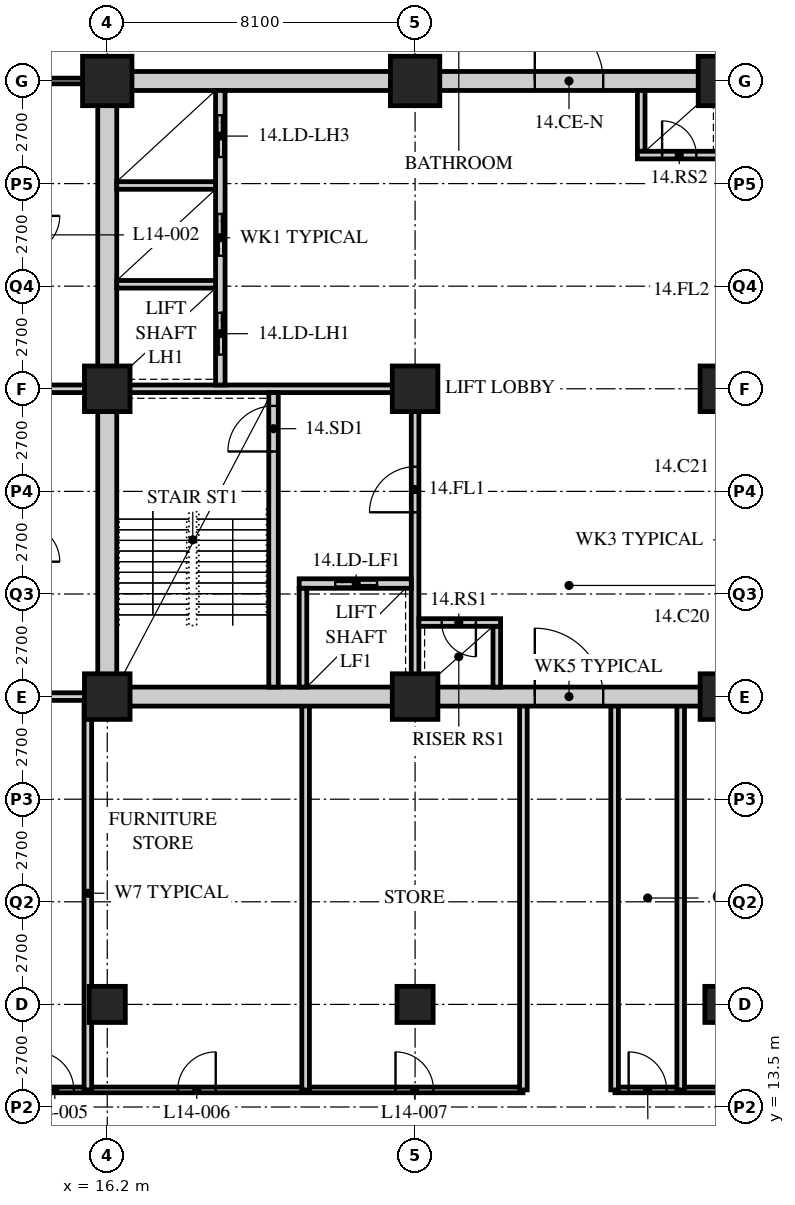
"""IFC4 building model, lengths in metres.
Left out: names, types, materials, properties, quantities, classifications, styles, units other than length and angle.
Written with IfcOpenShell. Run it as: python <this file> out.ifc"""

import sys

from ifc_helpers import new_model, si_unit, direction, frame, frame_2d, origin, origin_2d, place, context, subcontext, project, spatial, rectangle, hollow_rectangle, extrude, element, fill, save


model = new_model("IFC4")
c1 = context("Model", 3, precision=1e-05, world=origin(), true_north=direction((0.0, 1.0)))
c2 = subcontext(c1, "Body", "Model", "MODEL_VIEW")
j1 = project(units=[si_unit("LENGTHUNIT", "METRE"), si_unit("PLANEANGLEUNIT", "RADIAN")], contexts=[c1])
p1 = place(None, origin())
s1 = spatial("IfcSite", under=j1, at=p1, CompositionType="ELEMENT")
p2 = place(p1, origin())
s2 = spatial("IfcBuilding", under=s1, at=p2, CompositionType="ELEMENT")
p3 = place(p2, frame((0.0, 0.0, 60.2)))
s3 = spatial("IfcBuildingStorey", under=s2, at=p3, CompositionType="ELEMENT", Elevation=60.2)
p4 = place(p3, frame((16.2, 16.2, 0.0), z_axis=(0.0, 0.0, 1.0), x_axis=(1.0, 0.0, 0.0)))
e1 = element("IfcColumn", 1, at=p4, inside=s3, PredefinedType="COLUMN", context=c2, shape_type="SweptSolid", body=[
    extrude(hollow_rectangle(XDim=0.95, YDim=0.95, WallThickness=0.095, at=origin_2d()), origin(), (0.0, 0.0, 1.0), 3.4),
])
for number, where, z_axis, x_axis in (
    (2, (16.2, 24.3, 0.0), (0.0, 0.0, 1.0), (1.0, 0.0, 0.0)),
    (3, (16.2, 32.4, 0.0), (0.0, 0.0, 1.0), (1.0, 0.0, 0.0)),
):
    element("IfcColumn", number, at=place(p3, frame(where, z_axis=z_axis, x_axis=x_axis)), inside=s3, PredefinedType="COLUMN", context=c2, shape_type="SweptSolid", body=[
        extrude(hollow_rectangle(XDim=1.2, YDim=1.2, WallThickness=0.12, at=origin_2d()), origin(), (0.0, 0.0, 1.0), 3.4),
    ])
p5 = place(p3, frame((16.2, 40.5, 0.0), z_axis=(0.0, 0.0, 1.0), x_axis=(1.0, 0.0, 0.0)))
e4 = element("IfcColumn", 4, at=p5, inside=s3, PredefinedType="COLUMN", context=c2, shape_type="SweptSolid", body=[
    extrude(hollow_rectangle(XDim=1.3, YDim=1.3, WallThickness=0.13, at=origin_2d()), origin(), (0.0, 0.0, 1.0), 3.4),
])
p6 = place(p3, frame((24.3, 16.2, 0.0), z_axis=(0.0, 0.0, 1.0), x_axis=(1.0, 0.0, 0.0)))
e5 = element("IfcColumn", 5, at=p6, inside=s3, PredefinedType="COLUMN", context=c2, shape_type="SweptSolid", body=[
    extrude(hollow_rectangle(XDim=0.95, YDim=0.95, WallThickness=0.095, at=origin_2d()), origin(), (0.0, 0.0, 1.0), 3.4),
])
for number, where, z_axis, x_axis in (
    (6, (24.3, 24.3, 0.0), (0.0, 0.0, 1.0), (1.0, 0.0, 0.0)),
    (7, (24.3, 32.4, 0.0), (0.0, 0.0, 1.0), (1.0, 0.0, 0.0)),
):
    element("IfcColumn", number, at=place(p3, frame(where, z_axis=z_axis, x_axis=x_axis)), inside=s3, PredefinedType="COLUMN", context=c2, shape_type="SweptSolid", body=[
        extrude(hollow_rectangle(XDim=1.2, YDim=1.2, WallThickness=0.12, at=origin_2d()), origin(), (0.0, 0.0, 1.0), 3.4),
    ])
p7 = place(p3, frame((24.3, 40.5, 0.0), z_axis=(0.0, 0.0, 1.0), x_axis=(1.0, 0.0, 0.0)))
e8 = element("IfcColumn", 8, at=p7, inside=s3, PredefinedType="COLUMN", context=c2, shape_type="SweptSolid", body=[
    extrude(hollow_rectangle(XDim=1.3, YDim=1.3, WallThickness=0.13, at=origin_2d()), origin(), (0.0, 0.0, 1.0), 3.4),
])
p8 = place(p3, frame((32.4, 16.2, 0.0), z_axis=(0.0, 0.0, 1.0), x_axis=(1.0, 0.0, 0.0)))
e9 = element("IfcColumn", 9, at=p8, inside=s3, PredefinedType="COLUMN", context=c2, shape_type="SweptSolid", body=[
    extrude(hollow_rectangle(XDim=0.95, YDim=0.95, WallThickness=0.095, at=origin_2d()), origin(), (0.0, 0.0, 1.0), 3.4),
])
for number, where, z_axis, x_axis in (
    (10, (32.4, 24.3, 0.0), (0.0, 0.0, 1.0), (1.0, 0.0, 0.0)),
    (11, (32.4, 32.4, 0.0), (0.0, 0.0, 1.0), (1.0, 0.0, 0.0)),
):
    element("IfcColumn", number, at=place(p3, frame(where, z_axis=z_axis, x_axis=x_axis)), inside=s3, PredefinedType="COLUMN", context=c2, shape_type="SweptSolid", body=[
        extrude(hollow_rectangle(XDim=1.2, YDim=1.2, WallThickness=0.12, at=origin_2d()), origin(), (0.0, 0.0, 1.0), 3.4),
    ])
p9 = place(p3, frame((32.4, 40.5, 0.0), z_axis=(0.0, 0.0, 1.0), x_axis=(1.0, 0.0, 0.0)))
e12 = element("IfcColumn", 12, at=p9, inside=s3, PredefinedType="COLUMN", context=c2, shape_type="SweptSolid", body=[
    extrude(hollow_rectangle(XDim=1.3, YDim=1.3, WallThickness=0.13, at=origin_2d()), origin(), (0.0, 0.0, 1.0), 3.4),
])
p10 = place(p3, frame((16.0, 40.5, 0.0), z_axis=(0.0, 0.0, 1.0), x_axis=(-1.0, 0.0, 0.0)))
e13 = element("IfcWall", 13, at=p10, inside=s3, PredefinedType="PARTITIONING", context=c2, shape_type="SweptSolid", body=[
    extrude(rectangle(XDim=2.05, YDim=0.15, at=frame_2d((1.025, 0.0))), origin(), (0.0, 0.0, 1.0), 2.578),
])
p11 = place(p3, frame((13.95, 13.95, 0.0), z_axis=(0.0, 0.0, 1.0), x_axis=(1.0, 0.0, 0.0)))
e14 = element("IfcWall", 14, at=p11, inside=s3, PredefinedType="PARTITIONING", context=c2, shape_type="SweptSolid", body=[
    extrude(rectangle(XDim=13.19, YDim=0.15, at=frame_2d((6.595, 0.0))), origin(), (0.0, 0.0, 1.0), 3.19),
])
p12 = place(p11, frame((0.37, 0.0, 0.0)))
e15 = element("IfcOpeningElement", 15, at=p12, cuts=e14, PredefinedType="OPENING", context=c2, shape_type="SweptSolid", body=[
    extrude(rectangle(XDim=1.0, YDim=2.1, at=frame_2d((0.5, 1.05))), frame((0.0, 0.085, 0.0), z_axis=(0.0, -1.0, 0.0), x_axis=(1.0, 0.0, 0.0)), (0.0, 0.0, 1.0), 0.17),
])
p13 = place(p11, frame((4.104, 0.0, 0.0)))
e16 = element("IfcOpeningElement", 16, at=p13, cuts=e14, PredefinedType="OPENING", context=c2, shape_type="SweptSolid", body=[
    extrude(rectangle(XDim=1.0, YDim=2.1, at=frame_2d((0.5, 1.05))), frame((0.0, 0.085, 0.0), z_axis=(0.0, -1.0, 0.0), x_axis=(1.0, 0.0, 0.0)), (0.0, 0.0, 1.0), 0.17),
])
p14 = place(p11, frame((9.835, 0.0, 0.0)))
e17 = element("IfcOpeningElement", 17, at=p14, cuts=e14, PredefinedType="OPENING", context=c2, shape_type="SweptSolid", body=[
    extrude(rectangle(XDim=1.0, YDim=2.1, at=frame_2d((0.5, 1.05))), frame((0.0, 0.085, 0.0), z_axis=(0.0, -1.0, 0.0), x_axis=(1.0, 0.0, 0.0)), (0.0, 0.0, 1.0), 0.17),
])
p15 = place(p3, frame((29.56, 13.95, 0.0), z_axis=(0.0, 0.0, 1.0), x_axis=(1.0, 0.0, 0.0)))
e18 = element("IfcWall", 18, at=p15, inside=s3, PredefinedType="PARTITIONING", context=c2, shape_type="SweptSolid", body=[
    extrude(rectangle(XDim=13.19, YDim=0.15, at=frame_2d((6.595, 0.0))), origin(), (0.0, 0.0, 1.0), 3.19),
])
p16 = place(p15, frame((0.36, 0.0, 0.0)))
e19 = element("IfcOpeningElement", 19, at=p16, cuts=e18, PredefinedType="OPENING", context=c2, shape_type="SweptSolid", body=[
    extrude(rectangle(XDim=1.0, YDim=2.1, at=frame_2d((0.5, 1.05))), frame((0.0, 0.085, 0.0), z_axis=(0.0, -1.0, 0.0), x_axis=(1.0, 0.0, 0.0)), (0.0, 0.0, 1.0), 0.17),
])
p17 = place(p15, frame((4.094, 0.0, 0.0)))
e20 = element("IfcOpeningElement", 20, at=p17, cuts=e18, PredefinedType="OPENING", context=c2, shape_type="SweptSolid", body=[
    extrude(rectangle(XDim=1.0, YDim=2.1, at=frame_2d((0.5, 1.05))), frame((0.0, 0.085, 0.0), z_axis=(0.0, -1.0, 0.0), x_axis=(1.0, 0.0, 0.0)), (0.0, 0.0, 1.0), 0.17),
])
p18 = place(p15, frame((9.825, 0.0, 0.0)))
e21 = element("IfcOpeningElement", 21, at=p18, cuts=e18, PredefinedType="OPENING", context=c2, shape_type="SweptSolid", body=[
    extrude(rectangle(XDim=1.0, YDim=2.1, at=frame_2d((0.5, 1.05))), frame((0.0, 0.085, 0.0), z_axis=(0.0, -1.0, 0.0), x_axis=(1.0, 0.0, 0.0)), (0.0, 0.0, 1.0), 0.17),
])
p19 = place(p3, frame((13.95, 32.4, 0.0), z_axis=(0.0, 0.0, 1.0), x_axis=(1.0, 0.0, 0.0)))
e22 = element("IfcWall", 22, at=p19, inside=s3, PredefinedType="SOLIDWALL", context=c2, shape_type="SweptSolid", body=[
    extrude(rectangle(XDim=2.25, YDim=0.2, at=frame_2d((1.125, 0.0))), origin(), (0.0, 0.0, 1.0), 2.578),
])
for number, where, z_axis, x_axis in (
    (23, (15.689, 13.95, 0.0), (0.0, 0.0, 1.0), (0.0, 1.0, 0.0)),
    (24, (21.42, 13.95, 0.0), (0.0, 0.0, 1.0), (0.0, 1.0, 0.0)),
    (25, (31.289, 13.95, 0.0), (0.0, 0.0, 1.0), (0.0, 1.0, 0.0)),
    (26, (27.15, 13.95, 0.0), (0.0, 0.0, 1.0), (0.0, 1.0, 0.0)),
    (27, (29.55, 13.95, 0.0), (0.0, 0.0, 1.0), (0.0, 1.0, 0.0)),
):
    element("IfcWall", number, at=place(p3, frame(where, z_axis=z_axis, x_axis=x_axis)), inside=s3, PredefinedType="SOLIDWALL", context=c2, shape_type="SweptSolid", body=[
        extrude(rectangle(XDim=10.35, YDim=0.2, at=frame_2d((5.175, 0.0))), origin(), (0.0, 0.0, 1.0), 3.19),
    ])
p20 = place(p3, frame((13.95, 24.3, 0.0), z_axis=(0.0, 0.0, 1.0), x_axis=(1.0, 0.0, 0.0)))
e28 = element("IfcWall", 28, at=p20, inside=s3, PredefinedType="SOLIDWALL", context=c2, shape_type="SweptSolid", body=[
    extrude(rectangle(XDim=2.25, YDim=0.2, at=frame_2d((1.125, 0.0))), origin(), (0.0, 0.0, 1.0), 2.578),
])
p21 = place(p3, frame((15.95, 24.3, 0.0), z_axis=(0.0, 0.0, 1.0), x_axis=(1.0, 0.0, 0.0)))
e29 = element("IfcWall", 29, at=p21, inside=s3, PredefinedType="SOLIDWALL", context=c2, shape_type="SweptSolid", body=[
    extrude(rectangle(XDim=24.8, YDim=0.5, at=frame_2d((12.4, 0.0))), origin(), (0.0, 0.0, 1.0), 2.54),
])
p22 = place(p21, frame((11.5, 0.0, 0.0)))
e30 = element("IfcOpeningElement", 30, at=p22, cuts=e29, PredefinedType="OPENING", context=c2, shape_type="SweptSolid", body=[
    extrude(rectangle(XDim=1.8, YDim=2.4, at=frame_2d((0.9, 1.2))), frame((0.0, 0.26, 0.0), z_axis=(0.0, -1.0, 0.0), x_axis=(1.0, 0.0, 0.0)), (0.0, 0.0, 1.0), 0.52),
])
p23 = place(p3, frame((15.95, 40.5, 0.0), z_axis=(0.0, 0.0, 1.0), x_axis=(1.0, 0.0, 0.0)))
e31 = element("IfcWall", 31, at=p23, inside=s3, PredefinedType="SOLIDWALL", context=c2, shape_type="SweptSolid", body=[
    extrude(rectangle(XDim=24.8, YDim=0.5, at=frame_2d((12.4, 0.0))), origin(), (0.0, 0.0, 1.0), 2.54),
])
p24 = place(p23, frame((11.5, 0.0, 0.0)))
e32 = element("IfcOpeningElement", 32, at=p24, cuts=e31, PredefinedType="OPENING", context=c2, shape_type="SweptSolid", body=[
    extrude(rectangle(XDim=1.8, YDim=2.4, at=frame_2d((0.9, 1.2))), frame((0.0, 0.26, 0.0), z_axis=(0.0, -1.0, 0.0), x_axis=(1.0, 0.0, 0.0)), (0.0, 0.0, 1.0), 0.52),
])
p25 = place(p3, frame((16.2, 24.55, 0.0), z_axis=(0.0, 0.0, 1.0), x_axis=(0.0, 1.0, 0.0)))
e33 = element("IfcWall", 33, at=p25, inside=s3, PredefinedType="SOLIDWALL", context=c2, shape_type="SweptSolid", body=[
    extrude(rectangle(XDim=15.7, YDim=0.5, at=frame_2d((7.85, 0.0))), origin(), (0.0, 0.0, 1.0), 2.578),
])
p26 = place(p3, frame((16.45, 32.4, 0.0), z_axis=(0.0, 0.0, 1.0), x_axis=(1.0, 0.0, 0.0)))
e34 = element("IfcWall", 34, at=p26, inside=s3, PredefinedType="SOLIDWALL", context=c2, shape_type="SweptSolid", body=[
    extrude(rectangle(XDim=7.95, YDim=0.2, at=frame_2d((3.975, 0.0))), origin(), (0.0, 0.0, 1.0), 2.578),
])
p27 = place(p3, frame((24.3, 24.55, 0.0), z_axis=(0.0, 0.0, 1.0), x_axis=(0.0, 1.0, 0.0)))
e35 = element("IfcWall", 35, at=p27, inside=s3, PredefinedType="SOLIDWALL", context=c2, shape_type="SweptSolid", body=[
    extrude(rectangle(XDim=7.75, YDim=0.2, at=frame_2d((3.875, 0.0))), origin(), (0.0, 0.0, 1.0), 2.578),
])
p28 = place(p27, frame((4.6, 0.0, 0.0)))
e36 = element("IfcOpeningElement", 36, at=p28, cuts=e35, PredefinedType="OPENING", context=c2, shape_type="SweptSolid", body=[
    extrude(rectangle(XDim=1.2, YDim=2.1, at=frame_2d((0.6, 1.05))), frame((0.0, 0.11, 0.0), z_axis=(0.0, -1.0, 0.0), x_axis=(1.0, 0.0, 0.0)), (0.0, 0.0, 1.0), 0.22),
])
p29 = place(p3, frame((20.575, 24.55, 0.0), z_axis=(0.0, 0.0, 1.0), x_axis=(0.0, 1.0, 0.0)))
e37 = element("IfcWall", 37, at=p29, inside=s3, PredefinedType="SOLIDWALL", context=c2, shape_type="SweptSolid", body=[
    extrude(rectangle(XDim=7.75, YDim=0.25, at=frame_2d((3.875, 0.0))), origin(), (0.0, 0.0, 1.0), 3.19),
])
p30 = place(p29, frame((6.2, 0.0, 0.0)))
e38 = element("IfcOpeningElement", 38, at=p30, cuts=e37, PredefinedType="OPENING", context=c2, shape_type="SweptSolid", body=[
    extrude(rectangle(XDim=1.2, YDim=2.1, at=frame_2d((0.6, 1.05))), frame((0.0, 0.135, 0.0), z_axis=(0.0, -1.0, 0.0), x_axis=(1.0, 0.0, 0.0)), (0.0, 0.0, 1.0), 0.27),
])
p31 = place(p3, frame((21.25, 27.275, 0.0), z_axis=(0.0, 0.0, 1.0), x_axis=(1.0, 0.0, 0.0)))
e39 = element("IfcWall", 39, at=p31, inside=s3, PredefinedType="SOLIDWALL", context=c2, shape_type="SweptSolid", body=[
    extrude(rectangle(XDim=2.95, YDim=0.25, at=frame_2d((1.475, 0.0))), origin(), (0.0, 0.0, 1.0), 3.19),
])
p32 = place(p31, frame((0.95, 0.0, 0.0)))
e40 = element("IfcOpeningElement", 40, at=p32, cuts=e39, PredefinedType="OPENING", context=c2, shape_type="SweptSolid", body=[
    extrude(rectangle(XDim=1.1, YDim=2.4, at=frame_2d((0.55, 1.2))), frame((0.0, 0.135, 0.0), z_axis=(0.0, -1.0, 0.0), x_axis=(1.0, 0.0, 0.0)), (0.0, 0.0, 1.0), 0.27),
])
p33 = place(p3, frame((21.35, 24.55, 0.0), z_axis=(0.0, 0.0, 1.0), x_axis=(0.0, 1.0, 0.0)))
e41 = element("IfcWall", 41, at=p33, inside=s3, PredefinedType="SOLIDWALL", context=c2, shape_type="SweptSolid", body=[
    extrude(rectangle(XDim=2.6, YDim=0.2, at=frame_2d((1.3, 0.0))), origin(), (0.0, 0.0, 1.0), 3.19),
])
p34 = place(p3, frame((19.175, 32.5, 0.0), z_axis=(0.0, 0.0, 1.0), x_axis=(0.0, 1.0, 0.0)))
e42 = element("IfcWall", 42, at=p34, inside=s3, PredefinedType="SOLIDWALL", context=c2, shape_type="SweptSolid", body=[
    extrude(rectangle(XDim=7.75, YDim=0.25, at=frame_2d((3.875, 0.0))), origin(), (0.0, 0.0, 1.0), 3.19),
])
p35 = place(p34, frame((0.8, 0.0, 0.0)))
e43 = element("IfcOpeningElement", 43, at=p35, cuts=e42, PredefinedType="OPENING", context=c2, shape_type="SweptSolid", body=[
    extrude(rectangle(XDim=1.1, YDim=2.4, at=frame_2d((0.55, 1.2))), frame((0.0, 0.135, 0.0), z_axis=(0.0, -1.0, 0.0), x_axis=(1.0, 0.0, 0.0)), (0.0, 0.0, 1.0), 0.27),
])
p36 = place(p34, frame((3.4, 0.0, 0.0)))
e44 = element("IfcOpeningElement", 44, at=p36, cuts=e42, PredefinedType="OPENING", context=c2, shape_type="SweptSolid", body=[
    extrude(rectangle(XDim=1.1, YDim=2.4, at=frame_2d((0.55, 1.2))), frame((0.0, 0.135, 0.0), z_axis=(0.0, -1.0, 0.0), x_axis=(1.0, 0.0, 0.0)), (0.0, 0.0, 1.0), 0.27),
])
p37 = place(p34, frame((6.0, 0.0, 0.0)))
e45 = element("IfcOpeningElement", 45, at=p37, cuts=e42, PredefinedType="OPENING", context=c2, shape_type="SweptSolid", body=[
    extrude(rectangle(XDim=1.1, YDim=2.4, at=frame_2d((0.55, 1.2))), frame((0.0, 0.135, 0.0), z_axis=(0.0, -1.0, 0.0), x_axis=(1.0, 0.0, 0.0)), (0.0, 0.0, 1.0), 0.27),
])
for number, where, z_axis, x_axis in (
    (46, (16.45, 35.15, 0.0), (0.0, 0.0, 1.0), (1.0, 0.0, 0.0)),
    (47, (16.45, 37.75, 0.0), (0.0, 0.0, 1.0), (1.0, 0.0, 0.0)),
):
    element("IfcWall", number, at=place(p3, frame(where, z_axis=z_axis, x_axis=x_axis)), inside=s3, PredefinedType="SOLIDWALL", context=c2, shape_type="SweptSolid", body=[
        extrude(rectangle(XDim=2.6, YDim=0.2, at=frame_2d((1.3, 0.0))), origin(), (0.0, 0.0, 1.0), 3.19),
    ])
p38 = place(p3, frame((26.45, 24.55, 0.0), z_axis=(0.0, 0.0, 1.0), x_axis=(0.0, 1.0, 0.0)))
e48 = element("IfcWall", 48, at=p38, inside=s3, PredefinedType="SOLIDWALL", context=c2, shape_type="SweptSolid", body=[
    extrude(rectangle(XDim=1.6, YDim=0.2, at=frame_2d((0.8, 0.0))), origin(), (0.0, 0.0, 1.0), 3.19),
])
p39 = place(p3, frame((24.4, 26.25, 0.0), z_axis=(0.0, 0.0, 1.0), x_axis=(1.0, 0.0, 0.0)))
e49 = element("IfcWall", 49, at=p39, inside=s3, PredefinedType="SOLIDWALL", context=c2, shape_type="SweptSolid", body=[
    extrude(rectangle(XDim=2.15, YDim=0.2, at=frame_2d((1.075, 0.0))), origin(), (0.0, 0.0, 1.0), 3.19),
])
p40 = place(p39, frame((0.6, 0.0, 0.0)))
e50 = element("IfcOpeningElement", 50, at=p40, cuts=e49, PredefinedType="OPENING", context=c2, shape_type="SweptSolid", body=[
    extrude(rectangle(XDim=0.9, YDim=2.1, at=frame_2d((0.45, 1.05))), frame((0.0, 0.11, 0.0), z_axis=(0.0, -1.0, 0.0), x_axis=(1.0, 0.0, 0.0)), (0.0, 0.0, 1.0), 0.22),
])
p41 = place(p3, frame((30.25, 38.65, 0.0), z_axis=(0.0, 0.0, 1.0), x_axis=(0.0, 1.0, 0.0)))
e51 = element("IfcWall", 51, at=p41, inside=s3, PredefinedType="SOLIDWALL", context=c2, shape_type="SweptSolid", body=[
    extrude(rectangle(XDim=1.6, YDim=0.2, at=frame_2d((0.8, 0.0))), origin(), (0.0, 0.0, 1.0), 3.19),
])
p42 = place(p3, frame((30.15, 38.55, 0.0), z_axis=(0.0, 0.0, 1.0), x_axis=(1.0, 0.0, 0.0)))
e52 = element("IfcWall", 52, at=p42, inside=s3, PredefinedType="SOLIDWALL", context=c2, shape_type="SweptSolid", body=[
    extrude(rectangle(XDim=2.15, YDim=0.2, at=frame_2d((1.075, 0.0))), origin(), (0.0, 0.0, 1.0), 3.19),
])
p43 = place(p42, frame((0.65, 0.0, 0.0)))
e53 = element("IfcOpeningElement", 53, at=p43, cuts=e52, PredefinedType="OPENING", context=c2, shape_type="SweptSolid", body=[
    extrude(rectangle(XDim=0.9, YDim=2.1, at=frame_2d((0.45, 1.05))), frame((0.0, 0.11, 0.0), z_axis=(0.0, -1.0, 0.0), x_axis=(1.0, 0.0, 0.0)), (0.0, 0.0, 1.0), 0.22),
])
p44 = place(p12, origin())
e54 = element("IfcDoor", 54, at=p44, inside=s3, OperationType="SINGLE_SWING_LEFT", PredefinedType="DOOR", context=c2, shape_type="SweptSolid", body=[
    extrude(rectangle(XDim=1.0, YDim=2.1, at=frame_2d((0.5, 1.05))), frame((0.0, 0.025, 0.0), z_axis=(0.0, -1.0, 0.0), x_axis=(1.0, 0.0, 0.0)), (0.0, 0.0, 1.0), 0.05),
])
fill(e15, e54)
p45 = place(p13, origin())
e55 = element("IfcDoor", 55, at=p45, inside=s3, OperationType="SINGLE_SWING_RIGHT", PredefinedType="DOOR", context=c2, shape_type="SweptSolid", body=[
    extrude(rectangle(XDim=1.0, YDim=2.1, at=frame_2d((0.5, 1.05))), frame((0.0, 0.025, 0.0), z_axis=(0.0, -1.0, 0.0), x_axis=(1.0, 0.0, 0.0)), (0.0, 0.0, 1.0), 0.05),
])
fill(e16, e55)
p46 = place(p14, origin())
e56 = element("IfcDoor", 56, at=p46, inside=s3, OperationType="SINGLE_SWING_LEFT", PredefinedType="DOOR", context=c2, shape_type="SweptSolid", body=[
    extrude(rectangle(XDim=1.0, YDim=2.1, at=frame_2d((0.5, 1.05))), frame((0.0, 0.025, 0.0), z_axis=(0.0, -1.0, 0.0), x_axis=(1.0, 0.0, 0.0)), (0.0, 0.0, 1.0), 0.05),
])
fill(e17, e56)
p47 = place(p16, origin())
e57 = element("IfcDoor", 57, at=p47, inside=s3, OperationType="SINGLE_SWING_LEFT", PredefinedType="DOOR", context=c2, shape_type="SweptSolid", body=[
    extrude(rectangle(XDim=1.0, YDim=2.1, at=frame_2d((0.5, 1.05))), frame((0.0, 0.025, 0.0), z_axis=(0.0, -1.0, 0.0), x_axis=(1.0, 0.0, 0.0)), (0.0, 0.0, 1.0), 0.05),
])
fill(e19, e57)
p48 = place(p30, origin())
e58 = element("IfcDoor", 58, at=p48, inside=s3, OperationType="SINGLE_SWING_LEFT", PredefinedType="DOOR", context=c2, shape_type="SweptSolid", body=[
    extrude(rectangle(XDim=1.2, YDim=2.1, at=frame_2d((0.6, 1.05))), frame((0.0, 0.025, 0.0), z_axis=(0.0, -1.0, 0.0), x_axis=(1.0, 0.0, 0.0)), (0.0, 0.0, 1.0), 0.05),
])
fill(e38, e58)
p49 = place(p28, origin())
e59 = element("IfcDoor", 59, at=p49, inside=s3, OperationType="SINGLE_SWING_LEFT", PredefinedType="DOOR", context=c2, shape_type="SweptSolid", body=[
    extrude(rectangle(XDim=1.2, YDim=2.1, at=frame_2d((0.6, 1.05))), frame((0.0, 0.025, 0.0), z_axis=(0.0, -1.0, 0.0), x_axis=(1.0, 0.0, 0.0)), (0.0, 0.0, 1.0), 0.05),
])
fill(e36, e59)
p50 = place(p40, origin())
e60 = element("IfcDoor", 60, at=p50, inside=s3, OperationType="SINGLE_SWING_LEFT", PredefinedType="DOOR", context=c2, shape_type="SweptSolid", body=[
    extrude(rectangle(XDim=0.9, YDim=2.1, at=frame_2d((0.45, 1.05))), frame((0.0, 0.025, 0.0), z_axis=(0.0, -1.0, 0.0), x_axis=(1.0, 0.0, 0.0)), (0.0, 0.0, 1.0), 0.05),
])
fill(e50, e60)
p51 = place(p43, origin())
e61 = element("IfcDoor", 61, at=p51, inside=s3, OperationType="SINGLE_SWING_LEFT", PredefinedType="DOOR", context=c2, shape_type="SweptSolid", body=[
    extrude(rectangle(XDim=0.9, YDim=2.1, at=frame_2d((0.45, 1.05))), frame((0.0, 0.025, 0.0), z_axis=(0.0, -1.0, 0.0), x_axis=(1.0, 0.0, 0.0)), (0.0, 0.0, 1.0), 0.05),
])
fill(e53, e61)
p52 = place(p35, origin())
e62 = element("IfcDoor", 62, at=p52, inside=s3, OperationType="DOUBLE_DOOR_SLIDING", PredefinedType="DOOR", context=c2, shape_type="SweptSolid", body=[
    extrude(rectangle(XDim=1.1, YDim=2.4, at=frame_2d((0.55, 1.2))), frame((0.0, 0.025, 0.0), z_axis=(0.0, -1.0, 0.0), x_axis=(1.0, 0.0, 0.0)), (0.0, 0.0, 1.0), 0.05),
])
fill(e43, e62)
p53 = place(p36, origin())
e63 = element("IfcDoor", 63, at=p53, inside=s3, OperationType="DOUBLE_DOOR_SLIDING", PredefinedType="DOOR", context=c2, shape_type="SweptSolid", body=[
    extrude(rectangle(XDim=1.1, YDim=2.4, at=frame_2d((0.55, 1.2))), frame((0.0, 0.025, 0.0), z_axis=(0.0, -1.0, 0.0), x_axis=(1.0, 0.0, 0.0)), (0.0, 0.0, 1.0), 0.05),
])
fill(e44, e63)
p54 = place(p37, origin())
e64 = element("IfcDoor", 64, at=p54, inside=s3, OperationType="DOUBLE_DOOR_SLIDING", PredefinedType="DOOR", context=c2, shape_type="SweptSolid", body=[
    extrude(rectangle(XDim=1.1, YDim=2.4, at=frame_2d((0.55, 1.2))), frame((0.0, 0.025, 0.0), z_axis=(0.0, -1.0, 0.0), x_axis=(1.0, 0.0, 0.0)), (0.0, 0.0, 1.0), 0.05),
])
fill(e45, e64)
p55 = place(p32, origin())
e65 = element("IfcDoor", 65, at=p55, inside=s3, OperationType="DOUBLE_DOOR_SLIDING", PredefinedType="DOOR", context=c2, shape_type="SweptSolid", body=[
    extrude(rectangle(XDim=1.1, YDim=2.4, at=frame_2d((0.55, 1.2))), frame((0.0, 0.025, 0.0), z_axis=(0.0, -1.0, 0.0), x_axis=(1.0, 0.0, 0.0)), (0.0, 0.0, 1.0), 0.05),
])
fill(e40, e65)
p56 = place(p22, origin())
e66 = element("IfcDoor", 66, at=p56, inside=s3, OperationType="DOUBLE_DOOR_SINGLE_SWING", PredefinedType="DOOR", context=c2, shape_type="SweptSolid", body=[
    extrude(rectangle(XDim=1.8, YDim=2.4, at=frame_2d((0.9, 1.2))), frame((0.0, 0.025, 0.0), z_axis=(0.0, -1.0, 0.0), x_axis=(1.0, 0.0, 0.0)), (0.0, 0.0, 1.0), 0.05),
])
fill(e30, e66)
p57 = place(p24, origin())
e67 = element("IfcDoor", 67, at=p57, inside=s3, OperationType="DOUBLE_DOOR_SINGLE_SWING", PredefinedType="DOOR", context=c2, shape_type="SweptSolid", body=[
    extrude(rectangle(XDim=1.8, YDim=2.4, at=frame_2d((0.9, 1.2))), frame((0.0, 0.025, 0.0), z_axis=(0.0, -1.0, 0.0), x_axis=(1.0, 0.0, 0.0)), (0.0, 0.0, 1.0), 0.05),
])
fill(e32, e67)
save(model, sys.argv[1])
